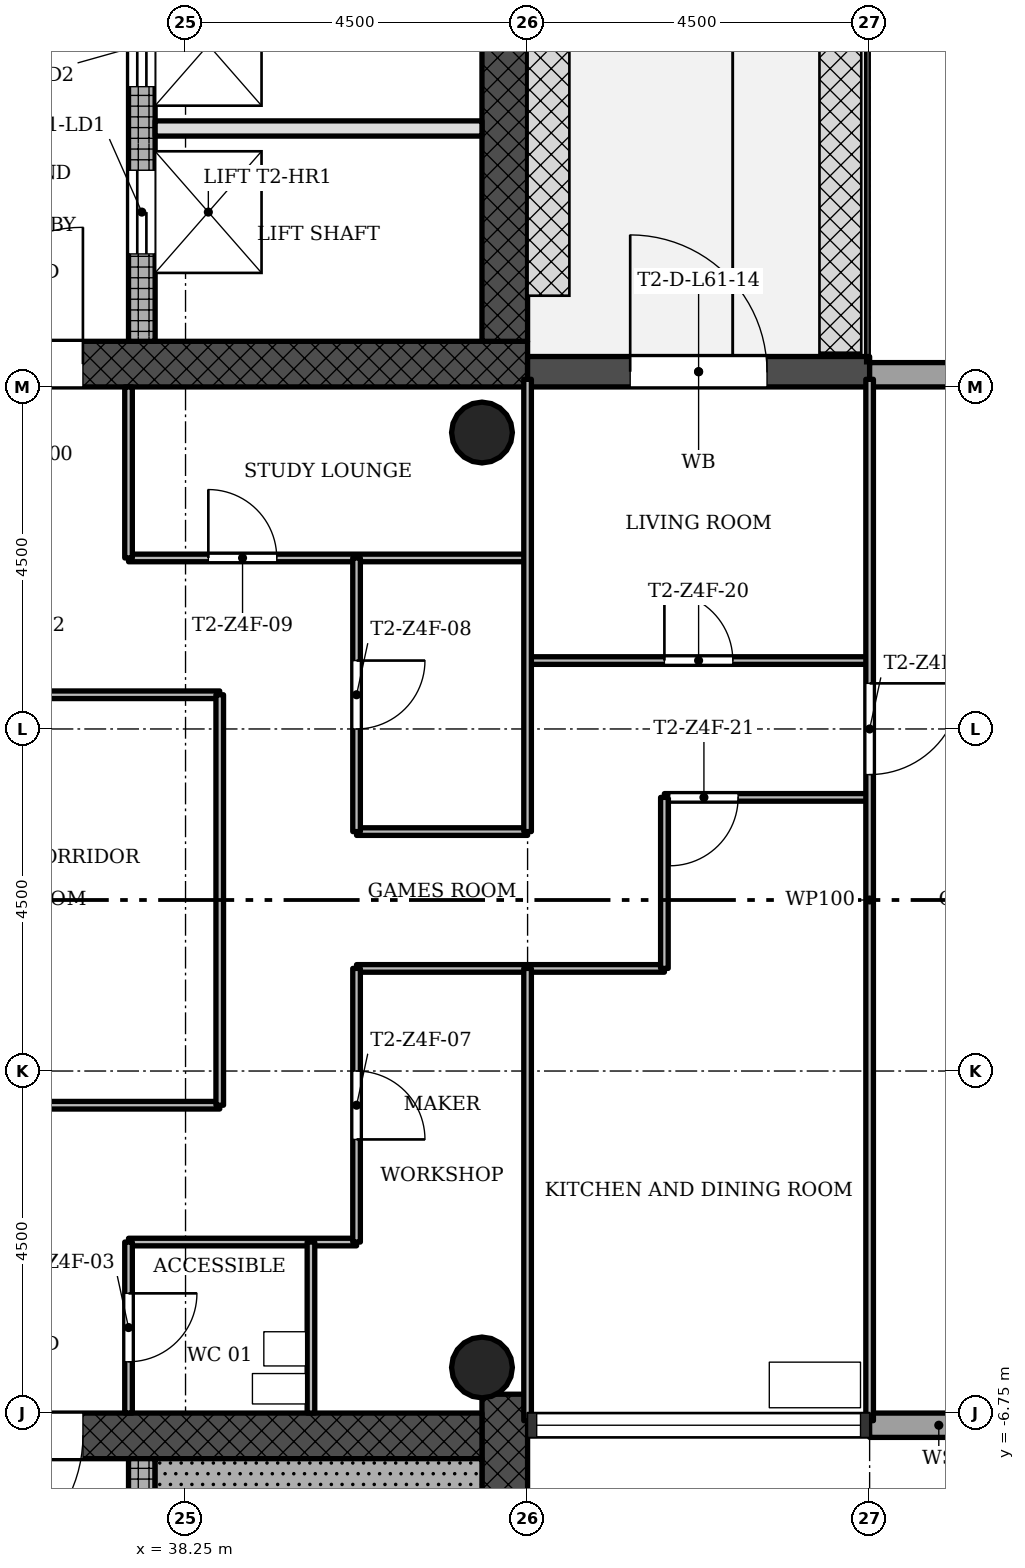
"""IFC4 building model, lengths in metres.
Left out: names, types, materials, properties, quantities, classifications, styles, units other than length and angle.
Written with IfcOpenShell. Run it as: python <this file> out.ifc"""

import sys

from ifc_helpers import new_model, si_unit, direction, frame, frame_2d, origin, origin_2d, place, context, subcontext, project, spatial, rectangle, hollow_circle, extrude, element, fill, save


model = new_model("IFC4")
c1 = context("Model", 3, precision=1e-05, world=origin(), true_north=direction((0.0, 1.0)))
c2 = subcontext(c1, "Body", "Model", "MODEL_VIEW")
j1 = project(units=[si_unit("LENGTHUNIT", "METRE"), si_unit("PLANEANGLEUNIT", "RADIAN")], contexts=[c1])
p1 = place(None, origin())
s1 = spatial("IfcSite", under=j1, at=p1, CompositionType="ELEMENT")
p2 = place(p1, origin())
s2 = spatial("IfcBuilding", under=s1, at=p2, CompositionType="ELEMENT")
p3 = place(p2, frame((0.0, 0.0, 219.8)))
s3 = spatial("IfcBuildingStorey", under=s2, at=p3, CompositionType="ELEMENT", Elevation=219.8)
p4 = place(p3, frame((29.85, 7.05, 0.0), z_axis=(0.0, 0.0, 1.0), x_axis=(1.0, 0.0, 0.0)))
e1 = element("IfcWall", 1, at=p4, inside=s3, PredefinedType="SHEAR", context=c2, shape_type="SweptSolid", body=[
    extrude(rectangle(XDim=12.9, YDim=0.6, at=frame_2d((6.45, 0.0))), origin(), (0.0, 0.0, 1.0), 3.4),
])
p5 = place(p4, frame((5.25, 0.0, 0.0)))
e2 = element("IfcOpeningElement", 2, at=p5, cuts=e1, PredefinedType="OPENING", context=c2, shape_type="SweptSolid", body=[
    extrude(rectangle(XDim=1.8, YDim=2.1, at=frame_2d((0.9, 1.05))), frame((0.0, 0.31, 0.0), z_axis=(0.0, -1.0, 0.0), x_axis=(1.0, 0.0, 0.0)), (0.0, 0.0, 1.0), 0.62),
])
p6 = place(p3, frame((42.45, 7.35, 0.0), z_axis=(0.0, 0.0, 1.0), x_axis=(0.0, 1.0, 0.0)))
e3 = element("IfcWall", 3, at=p6, inside=s3, PredefinedType="SHEAR", context=c2, shape_type="SweptSolid", body=[
    extrude(rectangle(XDim=8.4, YDim=0.6, at=frame_2d((4.2, 0.0))), origin(), (0.0, 0.0, 1.0), 3.4),
])
p7 = place(p3, frame((37.675, 7.35, 0.0), z_axis=(0.0, 0.0, 1.0), x_axis=(0.0, 1.0, 0.0)))
e4 = element("IfcWall", 4, at=p7, inside=s3, PredefinedType="SHEAR", context=c2, shape_type="SweptSolid", body=[
    extrude(rectangle(XDim=7.8, YDim=0.35, at=frame_2d((3.9, 0.0))), origin(), (0.0, 0.0, 1.0), 3.4),
])
p8 = place(p7, frame((1.15, 0.0, 0.0)))
e5 = element("IfcOpeningElement", 5, at=p8, cuts=e4, PredefinedType="OPENING", context=c2, shape_type="SweptSolid", body=[
    extrude(rectangle(XDim=1.1, YDim=2.1, at=frame_2d((0.55, 1.05))), frame((0.0, 0.185, 0.0), z_axis=(0.0, -1.0, 0.0), x_axis=(1.0, 0.0, 0.0)), (0.0, 0.0, 1.0), 0.37),
])
p9 = place(p7, frame((3.35, 0.0, 0.0)))
e6 = element("IfcOpeningElement", 6, at=p9, cuts=e4, PredefinedType="OPENING", context=c2, shape_type="SweptSolid", body=[
    extrude(rectangle(XDim=1.1, YDim=2.1, at=frame_2d((0.55, 1.05))), frame((0.0, 0.185, 0.0), z_axis=(0.0, -1.0, 0.0), x_axis=(1.0, 0.0, 0.0)), (0.0, 0.0, 1.0), 0.37),
])
p10 = place(p7, frame((5.55, 0.0, 0.0)))
e7 = element("IfcOpeningElement", 7, at=p10, cuts=e4, PredefinedType="OPENING", context=c2, shape_type="SweptSolid", body=[
    extrude(rectangle(XDim=1.1, YDim=2.1, at=frame_2d((0.55, 1.05))), frame((0.0, 0.185, 0.0), z_axis=(0.0, -1.0, 0.0), x_axis=(1.0, 0.0, 0.0)), (0.0, 0.0, 1.0), 0.37),
])
p11 = place(p3, frame((42.45, -15.15, 0.0), z_axis=(0.0, 0.0, 1.0), x_axis=(0.0, 1.0, 0.0)))
e8 = element("IfcWall", 8, at=p11, inside=s3, PredefinedType="SHEAR", context=c2, shape_type="SweptSolid", body=[
    extrude(rectangle(XDim=8.648, YDim=0.6, at=frame_2d((4.324, 0.0))), origin(), (0.0, 0.0, 1.0), 3.4),
])
p12 = place(p3, frame((42.15, -7.05, 0.0), z_axis=(0.0, 0.0, 1.0), x_axis=(-1.0, 0.0, 0.0)))
e9 = element("IfcWall", 9, at=p12, inside=s3, PredefinedType="SHEAR", context=c2, shape_type="SweptSolid", body=[
    extrude(rectangle(XDim=12.9, YDim=0.6, at=frame_2d((6.45, 0.0))), origin(), (0.0, 0.0, 1.0), 3.4),
])
p13 = place(p12, frame((5.25, 0.0, 0.0)))
e10 = element("IfcOpeningElement", 10, at=p13, cuts=e9, PredefinedType="OPENING", context=c2, shape_type="SweptSolid", body=[
    extrude(rectangle(XDim=1.8, YDim=2.1, at=frame_2d((0.9, 1.05))), frame((0.0, 0.31, 0.0), z_axis=(0.0, -1.0, 0.0), x_axis=(1.0, 0.0, 0.0)), (0.0, 0.0, 1.0), 0.62),
])
p14 = place(p3, frame((37.675, -15.15, 0.0), z_axis=(0.0, 0.0, 1.0), x_axis=(0.0, 1.0, 0.0)))
e11 = element("IfcWall", 11, at=p14, inside=s3, PredefinedType="SHEAR", context=c2, shape_type="SweptSolid", body=[
    extrude(rectangle(XDim=7.8, YDim=0.35, at=frame_2d((3.9, 0.0))), origin(), (0.0, 0.0, 1.0), 3.4),
])
p15 = place(p14, frame((5.85, 0.0, 0.0)))
e12 = element("IfcOpeningElement", 12, at=p15, cuts=e11, PredefinedType="OPENING", context=c2, shape_type="SweptSolid", body=[
    extrude(rectangle(XDim=0.9, YDim=2.1, at=frame_2d((0.45, 1.05))), frame((0.0, 0.185, 0.0), z_axis=(0.0, -1.0, 0.0), x_axis=(1.0, 0.0, 0.0)), (0.0, 0.0, 1.0), 0.37),
])
for number, where, z_axis, x_axis in (
    (13, (42.15, -6.15, 0.0), (0.0, 0.0, 1.0), (1.0, 0.0, 0.0)),
    (14, (42.15, 6.15, 0.0), (0.0, 0.0, 1.0), (1.0, 0.0, 0.0)),
):
    element("IfcColumn", number, at=place(p3, frame(where, z_axis=z_axis, x_axis=x_axis)), inside=s3, PredefinedType="COLUMN", context=c2, shape_type="SweptSolid", body=[
        extrude(hollow_circle(Radius=0.4, WallThickness=0.028, at=origin_2d()), origin(), (0.0, 0.0, 1.0), 3.4),
    ])
p16 = place(p3, frame((47.25, -6.91, -0.3), z_axis=(0.0, 0.0, 1.0), x_axis=(1.0, 0.0, 0.0)))
e15 = element("IfcWall", 15, at=p16, inside=s3, PredefinedType="STANDARD", context=c2, shape_type="SweptSolid", body=[
    extrude(rectangle(XDim=1.82, YDim=0.32, at=frame_2d((0.91, 0.0))), origin(), (0.0, 0.0, 1.0), 3.4),
])
p17 = place(p3, frame((48.75, 6.91, -0.3), z_axis=(0.0, 0.0, 1.0), x_axis=(-1.0, 0.0, 0.0)))
e16 = element("IfcWall", 16, at=p17, inside=s3, PredefinedType="STANDARD", context=c2, shape_type="SweptSolid", body=[
    extrude(rectangle(XDim=1.5, YDim=0.32, at=frame_2d((0.75, 0.0))), origin(), (0.0, 0.0, 1.0), 3.4),
])
p18 = place(p3, frame((47.25, 6.95, -0.02), z_axis=(0.0, 0.0, 1.0), x_axis=(-1.0, 0.0, 0.0)))
e17 = element("IfcWall", 17, at=p18, inside=s3, PredefinedType="STANDARD", context=c2, shape_type="SweptSolid", body=[
    extrude(rectangle(XDim=4.5, YDim=0.4, at=frame_2d((2.25, 0.0))), origin(), (0.0, 0.0, 1.0), 3.12),
])
p19 = place(p18, frame((1.35, 0.0, 0.02)))
e18 = element("IfcOpeningElement", 18, at=p19, cuts=e17, PredefinedType="OPENING", context=c2, shape_type="SweptSolid", body=[
    extrude(rectangle(XDim=1.8, YDim=2.1, at=frame_2d((0.9, 1.05))), frame((0.0, 0.21, 0.0), z_axis=(0.0, -1.0, 0.0), x_axis=(1.0, 0.0, 0.0)), (0.0, 0.0, 1.0), 0.42),
])
p20 = place(p3, frame((42.15, 10.15, 0.0), z_axis=(0.0, 0.0, 1.0), x_axis=(-1.0, 0.0, 0.0)))
e19 = element("IfcWall", 19, at=p20, inside=s3, PredefinedType="SOLIDWALL", context=c2, shape_type="SweptSolid", body=[
    extrude(rectangle(XDim=4.3, YDim=0.2, at=frame_2d((2.15, 0.0))), origin(), (0.0, 0.0, 1.0), 3.0),
])
p21 = place(p3, frame((40.5, -4.5, 0.0), z_axis=(0.0, 0.0, 1.0), x_axis=(-1.0, 0.0, 0.0)))
e20 = element("IfcWall", 20, at=p21, inside=s3, PredefinedType="PARTITIONING", context=c2, shape_type="SweptSolid", body=[
    extrude(rectangle(XDim=3.0, YDim=0.1, at=frame_2d((1.5, 0.0))), origin(), (0.0, 0.0, 1.0), 3.0),
])
p22 = place(p3, frame((38.7, -2.7, 0.0), z_axis=(0.0, 0.0, 1.0), x_axis=(-1.0, 0.0, 0.0)))
e21 = element("IfcWall", 21, at=p22, inside=s3, PredefinedType="PARTITIONING", context=c2, shape_type="SweptSolid", body=[
    extrude(rectangle(XDim=5.4, YDim=0.1, at=frame_2d((2.7, 0.0))), origin(), (0.0, 0.0, 1.0), 3.0),
])
p23 = place(p3, frame((44.55, -0.9, 0.0), z_axis=(0.0, 0.0, 1.0), x_axis=(-1.0, 0.0, 0.0)))
e22 = element("IfcWall", 22, at=p23, inside=s3, PredefinedType="PARTITIONING", context=c2, shape_type="SweptSolid", body=[
    extrude(rectangle(XDim=4.05, YDim=0.1, at=frame_2d((2.025, 0.0))), origin(), (0.0, 0.0, 1.0), 3.0),
])
p24 = place(p3, frame((42.75, 0.9, 0.0), z_axis=(0.0, 0.0, 1.0), x_axis=(-1.0, 0.0, 0.0)))
e23 = element("IfcWall", 23, at=p24, inside=s3, PredefinedType="PARTITIONING", context=c2, shape_type="SweptSolid", body=[
    extrude(rectangle(XDim=2.25, YDim=0.1, at=frame_2d((1.125, 0.0))), origin(), (0.0, 0.0, 1.0), 3.0),
])
p25 = place(p3, frame((47.25, 1.35, 0.0), z_axis=(0.0, 0.0, 1.0), x_axis=(-1.0, 0.0, 0.0)))
e24 = element("IfcWall", 24, at=p25, inside=s3, PredefinedType="PARTITIONING", context=c2, shape_type="SweptSolid", body=[
    extrude(rectangle(XDim=2.7, YDim=0.1, at=frame_2d((1.35, 0.0))), origin(), (0.0, 0.0, 1.0), 3.0),
])
p26 = place(p25, frame((1.73, 0.0, 0.0)))
e25 = element("IfcOpeningElement", 25, at=p26, cuts=e24, PredefinedType="OPENING", context=c2, shape_type="SweptSolid", body=[
    extrude(rectangle(XDim=0.9, YDim=2.1, at=frame_2d((0.45, 1.05))), frame((0.0, 0.06, 0.0), z_axis=(0.0, -1.0, 0.0), x_axis=(1.0, 0.0, 0.0)), (0.0, 0.0, 1.0), 0.12),
])
p27 = place(p3, frame((38.7, 2.7, 0.0), z_axis=(0.0, 0.0, 1.0), x_axis=(-1.0, 0.0, 0.0)))
e26 = element("IfcWall", 26, at=p27, inside=s3, PredefinedType="PARTITIONING", context=c2, shape_type="SweptSolid", body=[
    extrude(rectangle(XDim=5.4, YDim=0.1, at=frame_2d((2.7, 0.0))), origin(), (0.0, 0.0, 1.0), 3.0),
])
p28 = place(p27, frame((2.25, 0.0, 0.0)))
e27 = element("IfcOpeningElement", 27, at=p28, cuts=e26, PredefinedType="OPENING", context=c2, shape_type="SweptSolid", body=[
    extrude(rectangle(XDim=0.9, YDim=2.1, at=frame_2d((0.45, 1.05))), frame((0.0, 0.06, 0.0), z_axis=(0.0, -1.0, 0.0), x_axis=(1.0, 0.0, 0.0)), (0.0, 0.0, 1.0), 0.12),
])
p29 = place(p3, frame((47.25, 3.15, 0.0), z_axis=(0.0, 0.0, 1.0), x_axis=(-1.0, 0.0, 0.0)))
e28 = element("IfcWall", 28, at=p29, inside=s3, PredefinedType="PARTITIONING", context=c2, shape_type="SweptSolid", body=[
    extrude(rectangle(XDim=4.5, YDim=0.1, at=frame_2d((2.25, 0.0))), origin(), (0.0, 0.0, 1.0), 3.0),
])
p30 = place(p29, frame((1.8, 0.0, 0.0)))
e29 = element("IfcOpeningElement", 29, at=p30, cuts=e28, PredefinedType="OPENING", context=c2, shape_type="SweptSolid", body=[
    extrude(rectangle(XDim=0.9, YDim=2.1, at=frame_2d((0.45, 1.05))), frame((0.0, 0.06, 0.0), z_axis=(0.0, -1.0, 0.0), x_axis=(1.0, 0.0, 0.0)), (0.0, 0.0, 1.0), 0.12),
])
p31 = place(p3, frame((42.75, 4.5, 0.0), z_axis=(0.0, 0.0, 1.0), x_axis=(-1.0, 0.0, 0.0)))
e30 = element("IfcWall", 30, at=p31, inside=s3, PredefinedType="PARTITIONING", context=c2, shape_type="SweptSolid", body=[
    extrude(rectangle(XDim=5.25, YDim=0.1, at=frame_2d((2.625, 0.0))), origin(), (0.0, 0.0, 1.0), 3.0),
])
p32 = place(p31, frame((3.3, 0.0, 0.0)))
e31 = element("IfcOpeningElement", 31, at=p32, cuts=e30, PredefinedType="OPENING", context=c2, shape_type="SweptSolid", body=[
    extrude(rectangle(XDim=0.9, YDim=2.1, at=frame_2d((0.45, 1.05))), frame((0.0, 0.06, 0.0), z_axis=(0.0, -1.0, 0.0), x_axis=(1.0, 0.0, 0.0)), (0.0, 0.0, 1.0), 0.12),
])
p33 = place(p3, frame((47.25, -6.85, 0.0), z_axis=(0.0, 0.0, 1.0), x_axis=(0.0, 1.0, 0.0)))
e32 = element("IfcWall", 32, at=p33, inside=s3, PredefinedType="PARTITIONING", context=c2, shape_type="SweptSolid", body=[
    extrude(rectangle(XDim=13.7, YDim=0.1, at=frame_2d((6.85, 0.0))), origin(), (0.0, 0.0, 1.0), 3.0),
])
p34 = place(p33, frame((8.5, 0.0, 0.0)))
e33 = element("IfcOpeningElement", 33, at=p34, cuts=e32, PredefinedType="OPENING", context=c2, shape_type="SweptSolid", body=[
    extrude(rectangle(XDim=1.2, YDim=2.1, at=frame_2d((0.6, 1.05))), frame((0.0, 0.06, 0.0), z_axis=(0.0, -1.0, 0.0), x_axis=(1.0, 0.0, 0.0)), (0.0, 0.0, 1.0), 0.12),
])
p35 = place(p3, frame((44.55, -0.9, 0.0), z_axis=(0.0, 0.0, 1.0), x_axis=(0.0, 1.0, 0.0)))
e34 = element("IfcWall", 34, at=p35, inside=s3, PredefinedType="PARTITIONING", context=c2, shape_type="SweptSolid", body=[
    extrude(rectangle(XDim=2.25, YDim=0.1, at=frame_2d((1.125, 0.0))), origin(), (0.0, 0.0, 1.0), 3.0),
])
for number, where, z_axis, x_axis in (
    (35, (42.75, -6.85, 0.0), (0.0, 0.0, 1.0), (0.0, 1.0, 0.0)),
    (36, (42.75, 0.9, 0.0), (0.0, 0.0, 1.0), (0.0, 1.0, 0.0)),
):
    element("IfcWall", number, at=place(p3, frame(where, z_axis=z_axis, x_axis=x_axis)), inside=s3, PredefinedType="PARTITIONING", context=c2, shape_type="SweptSolid", body=[
        extrude(rectangle(XDim=5.95, YDim=0.1, at=frame_2d((2.975, 0.0))), origin(), (0.0, 0.0, 1.0), 3.0),
    ])
p36 = place(p3, frame((40.5, -4.5, 0.0), z_axis=(0.0, 0.0, 1.0), x_axis=(0.0, 1.0, 0.0)))
e37 = element("IfcWall", 37, at=p36, inside=s3, PredefinedType="PARTITIONING", context=c2, shape_type="SweptSolid", body=[
    extrude(rectangle(XDim=3.6, YDim=0.1, at=frame_2d((1.8, 0.0))), origin(), (0.0, 0.0, 1.0), 3.0),
])
p37 = place(p36, frame((1.35, 0.0, 0.0)))
e38 = element("IfcOpeningElement", 38, at=p37, cuts=e37, PredefinedType="OPENING", context=c2, shape_type="SweptSolid", body=[
    extrude(rectangle(XDim=0.9, YDim=2.1, at=frame_2d((0.45, 1.05))), frame((0.0, 0.06, 0.0), z_axis=(0.0, -1.0, 0.0), x_axis=(1.0, 0.0, 0.0)), (0.0, 0.0, 1.0), 0.12),
])
p38 = place(p3, frame((40.5, 0.9, 0.0), z_axis=(0.0, 0.0, 1.0), x_axis=(0.0, 1.0, 0.0)))
e39 = element("IfcWall", 39, at=p38, inside=s3, PredefinedType="PARTITIONING", context=c2, shape_type="SweptSolid", body=[
    extrude(rectangle(XDim=3.6, YDim=0.1, at=frame_2d((1.8, 0.0))), origin(), (0.0, 0.0, 1.0), 3.0),
])
p39 = place(p38, frame((1.35, 0.0, 0.0)))
e40 = element("IfcOpeningElement", 40, at=p39, cuts=e39, PredefinedType="OPENING", context=c2, shape_type="SweptSolid", body=[
    extrude(rectangle(XDim=0.9, YDim=2.1, at=frame_2d((0.45, 1.05))), frame((0.0, 0.06, 0.0), z_axis=(0.0, -1.0, 0.0), x_axis=(1.0, 0.0, 0.0)), (0.0, 0.0, 1.0), 0.12),
])
p40 = place(p3, frame((39.9, -6.75, 0.0), z_axis=(0.0, 0.0, 1.0), x_axis=(0.0, 1.0, 0.0)))
e41 = element("IfcWall", 41, at=p40, inside=s3, PredefinedType="PARTITIONING", context=c2, shape_type="SweptSolid", body=[
    extrude(rectangle(XDim=2.25, YDim=0.1, at=frame_2d((1.125, 0.0))), origin(), (0.0, 0.0, 1.0), 3.0),
])
p41 = place(p3, frame((38.7, -2.7, 0.0), z_axis=(0.0, 0.0, 1.0), x_axis=(0.0, 1.0, 0.0)))
e42 = element("IfcWall", 42, at=p41, inside=s3, PredefinedType="PARTITIONING", context=c2, shape_type="SweptSolid", body=[
    extrude(rectangle(XDim=5.4, YDim=0.1, at=frame_2d((2.7, 0.0))), origin(), (0.0, 0.0, 1.0), 3.0),
])
p42 = place(p3, frame((37.5, -6.75, 0.0), z_axis=(0.0, 0.0, 1.0), x_axis=(0.0, 1.0, 0.0)))
e43 = element("IfcWall", 43, at=p42, inside=s3, PredefinedType="PARTITIONING", context=c2, shape_type="SweptSolid", body=[
    extrude(rectangle(XDim=2.25, YDim=0.1, at=frame_2d((1.125, 0.0))), origin(), (0.0, 0.0, 1.0), 3.0),
])
p43 = place(p42, frame((0.675, 0.0, 0.0)))
e44 = element("IfcOpeningElement", 44, at=p43, cuts=e43, PredefinedType="OPENING", context=c2, shape_type="SweptSolid", body=[
    extrude(rectangle(XDim=0.9, YDim=2.1, at=frame_2d((0.45, 1.05))), frame((0.0, 0.06, 0.0), z_axis=(0.0, -1.0, 0.0), x_axis=(1.0, 0.0, 0.0)), (0.0, 0.0, 1.0), 0.12),
])
p44 = place(p3, frame((37.5, 4.5, 0.0), z_axis=(0.0, 0.0, 1.0), x_axis=(0.0, 1.0, 0.0)))
e45 = element("IfcWall", 45, at=p44, inside=s3, PredefinedType="PARTITIONING", context=c2, shape_type="SweptSolid", body=[
    extrude(rectangle(XDim=2.25, YDim=0.1, at=frame_2d((1.125, 0.0))), origin(), (0.0, 0.0, 1.0), 3.0),
])
p45 = place(p3, frame((37.85, -7.65, 0.0), z_axis=(0.0, 0.0, 1.0), x_axis=(1.0, 0.0, 0.0)))
e46 = element("IfcWall", 46, at=p45, inside=s3, PredefinedType="SHEAR", context=c2, shape_type="SweptSolid", body=[
    extrude(rectangle(XDim=4.3, YDim=0.6, at=frame_2d((2.15, 0.0))), origin(), (0.0, 0.0, 1.0), 3.4),
])
p46 = place(p19, origin())
e47 = element("IfcDoor", 47, at=p46, inside=s3, OperationType="SINGLE_SWING_RIGHT", PredefinedType="DOOR", context=c2, shape_type="SweptSolid", body=[
    extrude(rectangle(XDim=1.8, YDim=2.1, at=frame_2d((0.9, 1.05))), frame((0.0, 0.025, 0.0), z_axis=(0.0, -1.0, 0.0), x_axis=(1.0, 0.0, 0.0)), (0.0, 0.0, 1.0), 0.05),
])
fill(e18, e47)
p47 = place(p43, origin())
e48 = element("IfcDoor", 48, at=p47, inside=s3, OperationType="SINGLE_SWING_RIGHT", PredefinedType="DOOR", context=c2, shape_type="SweptSolid", body=[
    extrude(rectangle(XDim=0.9, YDim=2.1, at=frame_2d((0.45, 1.05))), frame((0.0, 0.025, 0.0), z_axis=(0.0, -1.0, 0.0), x_axis=(1.0, 0.0, 0.0)), (0.0, 0.0, 1.0), 0.05),
])
fill(e44, e48)
p48 = place(p37, origin())
e49 = element("IfcDoor", 49, at=p48, inside=s3, OperationType="SINGLE_SWING_LEFT", PredefinedType="DOOR", context=c2, shape_type="SweptSolid", body=[
    extrude(rectangle(XDim=0.9, YDim=2.1, at=frame_2d((0.45, 1.05))), frame((0.0, 0.025, 0.0), z_axis=(0.0, -1.0, 0.0), x_axis=(1.0, 0.0, 0.0)), (0.0, 0.0, 1.0), 0.05),
])
fill(e38, e49)
p49 = place(p39, origin())
e50 = element("IfcDoor", 50, at=p49, inside=s3, OperationType="SINGLE_SWING_RIGHT", PredefinedType="DOOR", context=c2, shape_type="SweptSolid", body=[
    extrude(rectangle(XDim=0.9, YDim=2.1, at=frame_2d((0.45, 1.05))), frame((0.0, 0.025, 0.0), z_axis=(0.0, -1.0, 0.0), x_axis=(1.0, 0.0, 0.0)), (0.0, 0.0, 1.0), 0.05),
])
fill(e40, e50)
p50 = place(p32, origin())
e51 = element("IfcDoor", 51, at=p50, inside=s3, OperationType="SINGLE_SWING_RIGHT", PredefinedType="DOOR", context=c2, shape_type="SweptSolid", body=[
    extrude(rectangle(XDim=0.9, YDim=2.1, at=frame_2d((0.45, 1.05))), frame((0.0, 0.025, 0.0), z_axis=(0.0, -1.0, 0.0), x_axis=(1.0, 0.0, 0.0)), (0.0, 0.0, 1.0), 0.05),
])
fill(e31, e51)
p51 = place(p30, origin())
e52 = element("IfcDoor", 52, at=p51, inside=s3, OperationType="SINGLE_SWING_RIGHT", PredefinedType="DOOR", context=c2, shape_type="SweptSolid", body=[
    extrude(rectangle(XDim=0.9, YDim=2.1, at=frame_2d((0.45, 1.05))), frame((0.0, 0.025, 0.0), z_axis=(0.0, -1.0, 0.0), x_axis=(1.0, 0.0, 0.0)), (0.0, 0.0, 1.0), 0.05),
])
fill(e29, e52)
p52 = place(p26, origin())
e53 = element("IfcDoor", 53, at=p52, inside=s3, OperationType="SINGLE_SWING_LEFT", PredefinedType="DOOR", context=c2, shape_type="SweptSolid", body=[
    extrude(rectangle(XDim=0.9, YDim=2.1, at=frame_2d((0.45, 1.05))), frame((0.0, 0.025, 0.0), z_axis=(0.0, -1.0, 0.0), x_axis=(1.0, 0.0, 0.0)), (0.0, 0.0, 1.0), 0.05),
])
fill(e25, e53)
p53 = place(p34, origin())
e54 = element("IfcDoor", 54, at=p53, inside=s3, OperationType="SINGLE_SWING_RIGHT", PredefinedType="DOOR", context=c2, shape_type="SweptSolid", body=[
    extrude(rectangle(XDim=1.2, YDim=2.1, at=frame_2d((0.6, 1.05))), frame((0.0, 0.025, 0.0), z_axis=(0.0, -1.0, 0.0), x_axis=(1.0, 0.0, 0.0)), (0.0, 0.0, 1.0), 0.05),
])
fill(e33, e54)
p54 = place(p8, origin())
e55 = element("IfcDoor", 55, at=p54, inside=s3, OperationType="SLIDING_TO_LEFT", PredefinedType="DOOR", context=c2, shape_type="SweptSolid", body=[
    extrude(rectangle(XDim=1.1, YDim=2.1, at=frame_2d((0.55, 1.05))), frame((0.0, 0.025, 0.0), z_axis=(0.0, -1.0, 0.0), x_axis=(1.0, 0.0, 0.0)), (0.0, 0.0, 1.0), 0.05),
])
fill(e5, e55)
p55 = place(p9, origin())
e56 = element("IfcDoor", 56, at=p55, inside=s3, OperationType="SLIDING_TO_LEFT", PredefinedType="DOOR", context=c2, shape_type="SweptSolid", body=[
    extrude(rectangle(XDim=1.1, YDim=2.1, at=frame_2d((0.55, 1.05))), frame((0.0, 0.025, 0.0), z_axis=(0.0, -1.0, 0.0), x_axis=(1.0, 0.0, 0.0)), (0.0, 0.0, 1.0), 0.05),
])
fill(e6, e56)
p56 = place(p5, origin())
e57 = element("IfcDoor", 57, at=p56, inside=s3, OperationType="SINGLE_SWING_LEFT", PredefinedType="DOOR", context=c2, shape_type="SweptSolid", body=[
    extrude(rectangle(XDim=1.8, YDim=2.1, at=frame_2d((0.9, 1.05))), frame((0.0, 0.025, 0.0), z_axis=(0.0, -1.0, 0.0), x_axis=(1.0, 0.0, 0.0)), (0.0, 0.0, 1.0), 0.05),
])
fill(e2, e57)
p57 = place(p13, origin())
e58 = element("IfcDoor", 58, at=p57, inside=s3, OperationType="SINGLE_SWING_LEFT", PredefinedType="DOOR", context=c2, shape_type="SweptSolid", body=[
    extrude(rectangle(XDim=1.8, YDim=2.1, at=frame_2d((0.9, 1.05))), frame((0.0, 0.025, 0.0), z_axis=(0.0, -1.0, 0.0), x_axis=(1.0, 0.0, 0.0)), (0.0, 0.0, 1.0), 0.05),
])
fill(e10, e58)
save(model, sys.argv[1])
